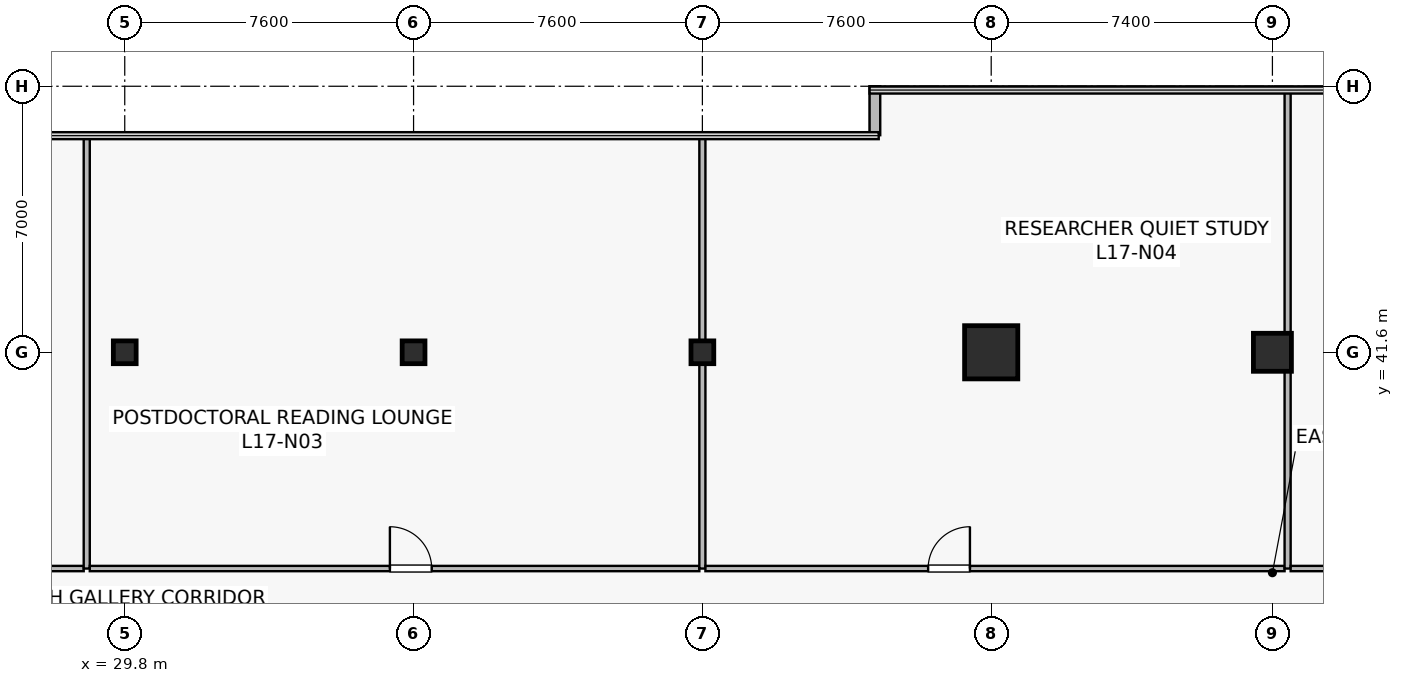
"""IFC4 building model, lengths in metres.
Left out: names, types, materials, properties, quantities, classifications, styles, units other than length and angle.
Written with IfcOpenShell. Run it as: python <this file> out.ifc"""

import sys

from ifc_helpers import new_model, si_unit, direction, frame, frame_2d, origin, origin_2d, place, context, subcontext, project, spatial, rectangle, hollow_rectangle, extrude, source, transform, mapped, element, fill, save


model = new_model("IFC4")
c1 = context("Model", 3, precision=1e-05, world=origin(), true_north=direction((0.0, 1.0)))
c2 = subcontext(c1, "Body", "Model", "MODEL_VIEW")
j1 = project(units=[si_unit("LENGTHUNIT", "METRE"), si_unit("PLANEANGLEUNIT", "RADIAN")], contexts=[c1])
p1 = place(None, origin())
s1 = spatial("IfcSite", under=j1, at=p1, CompositionType="ELEMENT")
p2 = place(p1, origin())
s2 = spatial("IfcBuilding", under=s1, at=p2, CompositionType="ELEMENT")
p3 = place(p2, frame((0.0, 0.0, 70.3)))
s3 = spatial("IfcBuildingStorey", under=s2, at=p3, CompositionType="ELEMENT", Elevation=70.3)
m1 = source(origin(), c2, "Body", "SweptSolid", [
    extrude(rectangle(XDim=1.4, YDim=1.4, at=origin_2d()), origin(), (0.0, 0.0, 1.0), 4.1),
])
p4 = place(p3, frame((52.6, 41.6, 0.0), z_axis=(0.0, 0.0, 1.0), x_axis=(1.0, 0.0, 0.0)))
e1 = element("IfcColumn", 1, at=p4, inside=s3, PredefinedType="COLUMN", context=c2, shape_type="MappedRepresentation", body=[
    mapped(m1, transform((0.0, 0.0, 0.0), scale=1.0)),
])
m2 = source(origin(), c2, "Body", "SweptSolid", [
    extrude(rectangle(XDim=1.0, YDim=1.0, at=origin_2d()), origin(), (0.0, 0.0, 1.0), 4.1),
])
p5 = place(p3, frame((60.0, 41.6, 0.0), z_axis=(0.0, 0.0, 1.0), x_axis=(1.0, 0.0, 0.0)))
e2 = element("IfcColumn", 2, at=p5, inside=s3, PredefinedType="COLUMN", context=c2, shape_type="MappedRepresentation", body=[
    mapped(m2, transform((0.0, 0.0, 0.0), scale=1.0)),
])
m3 = source(origin(), c2, "Body", "SweptSolid", [
    extrude(hollow_rectangle(XDim=0.6, YDim=0.6, WallThickness=0.028, at=origin_2d()), origin(), (0.0, 0.0, 1.0), 4.1),
])
for number, where, z_axis, x_axis in (
    (3, (29.8, 41.6, 0.0), (0.0, 0.0, 1.0), (1.0, 0.0, 0.0)),
    (4, (37.4, 41.6, 0.0), (0.0, 0.0, 1.0), (1.0, 0.0, 0.0)),
    (5, (45.0, 41.6, 0.0), (0.0, 0.0, 1.0), (1.0, 0.0, 0.0)),
):
    element("IfcColumn", number, at=place(p3, frame(where, z_axis=z_axis, x_axis=x_axis)), inside=s3, PredefinedType="COLUMN", context=c2, shape_type="MappedRepresentation", body=[
        mapped(m3, transform((0.0, 0.0, 0.0), scale=1.0)),
    ])
p6 = place(p3, frame((49.54, 48.6, 0.0), z_axis=(0.0, 0.0, 1.0), x_axis=(0.0, -1.0, 0.0)))
e6 = element("IfcWall", 6, at=p6, inside=s3, PredefinedType="STANDARD", context=c2, shape_type="SweptSolid", body=[
    extrude(rectangle(XDim=1.288, YDim=0.28, at=frame_2d((0.644, 0.0))), origin(), (0.0, 0.0, 1.0), 3.78),
])
p7 = place(p3, frame((15.48, 35.91, 0.0), z_axis=(0.0, 0.0, 1.0), x_axis=(1.0, 0.0, 0.0)))
e7 = element("IfcWall", 7, at=p7, inside=s3, PredefinedType="PARTITIONING", context=c2, shape_type="SweptSolid", body=[
    extrude(rectangle(XDim=13.24, YDim=0.14, at=frame_2d((6.62, 0.0))), origin(), (0.0, 0.0, 1.0), 3.115),
])
p8 = place(p7, frame((5.04, 0.0, 0.0)))
e8 = element("IfcOpeningElement", 8, at=p8, cuts=e7, PredefinedType="OPENING", context=c2, shape_type="SweptSolid", body=[
    extrude(rectangle(XDim=1.1, YDim=2.18, at=frame_2d((0.55, 1.09))), frame((0.0, 0.08, 0.0), z_axis=(0.0, -1.0, 0.0), x_axis=(1.0, 0.0, 0.0)), (0.0, 0.0, 1.0), 0.16),
])
p9 = place(p3, frame((28.8, 35.91, 0.0), z_axis=(0.0, 0.0, 1.0), x_axis=(0.0, 1.0, 0.0)))
e9 = element("IfcWall", 9, at=p9, inside=s3, PredefinedType="PARTITIONING", context=c2, shape_type="SweptSolid", body=[
    extrude(rectangle(XDim=11.38, YDim=0.16, at=frame_2d((5.69, 0.0))), origin(), (0.0, 0.0, 1.0), 3.015),
])
p10 = place(p3, frame((28.88, 35.91, 0.0), z_axis=(0.0, 0.0, 1.0), x_axis=(1.0, 0.0, 0.0)))
e10 = element("IfcWall", 10, at=p10, inside=s3, PredefinedType="PARTITIONING", context=c2, shape_type="SweptSolid", body=[
    extrude(rectangle(XDim=16.04, YDim=0.14, at=frame_2d((8.02, 0.0))), origin(), (0.0, 0.0, 1.0), 3.115),
])
p11 = place(p10, frame((7.897, 0.0, 0.0)))
e11 = element("IfcOpeningElement", 11, at=p11, cuts=e10, PredefinedType="OPENING", context=c2, shape_type="SweptSolid", body=[
    extrude(rectangle(XDim=1.1, YDim=2.18, at=frame_2d((0.55, 1.09))), frame((0.0, 0.08, 0.0), z_axis=(0.0, -1.0, 0.0), x_axis=(1.0, 0.0, 0.0)), (0.0, 0.0, 1.0), 0.16),
])
p12 = place(p3, frame((45.0, 35.91, 0.0), z_axis=(0.0, 0.0, 1.0), x_axis=(0.0, 1.0, 0.0)))
e12 = element("IfcWall", 12, at=p12, inside=s3, PredefinedType="PARTITIONING", context=c2, shape_type="SweptSolid", body=[
    extrude(rectangle(XDim=11.38, YDim=0.16, at=frame_2d((5.69, 0.0))), origin(), (0.0, 0.0, 1.0), 3.015),
])
p13 = place(p3, frame((45.08, 35.91, 0.0), z_axis=(0.0, 0.0, 1.0), x_axis=(1.0, 0.0, 0.0)))
e13 = element("IfcWall", 13, at=p13, inside=s3, PredefinedType="PARTITIONING", context=c2, shape_type="SweptSolid", body=[
    extrude(rectangle(XDim=15.24, YDim=0.14, at=frame_2d((7.62, 0.0))), origin(), (0.0, 0.0, 1.0), 3.115),
])
p14 = place(p13, frame((5.86, 0.0, 0.0)))
e14 = element("IfcOpeningElement", 14, at=p14, cuts=e13, PredefinedType="OPENING", context=c2, shape_type="SweptSolid", body=[
    extrude(rectangle(XDim=1.1, YDim=2.18, at=frame_2d((0.55, 1.09))), frame((0.0, 0.08, 0.0), z_axis=(0.0, -1.0, 0.0), x_axis=(1.0, 0.0, 0.0)), (0.0, 0.0, 1.0), 0.16),
])
p15 = place(p3, frame((60.4, 35.91, 0.0), z_axis=(0.0, 0.0, 1.0), x_axis=(0.0, 1.0, 0.0)))
e15 = element("IfcWall", 15, at=p15, inside=s3, PredefinedType="PARTITIONING", context=c2, shape_type="SweptSolid", body=[
    extrude(rectangle(XDim=12.58, YDim=0.16, at=frame_2d((6.29, 0.0))), origin(), (0.0, 0.0, 1.0), 3.015),
])
p16 = place(p3, frame((60.48, 35.91, 0.0), z_axis=(0.0, 0.0, 1.0), x_axis=(1.0, 0.0, 0.0)))
e16 = element("IfcWall", 16, at=p16, inside=s3, PredefinedType="PARTITIONING", context=c2, shape_type="SweptSolid", body=[
    extrude(rectangle(XDim=7.34, YDim=0.14, at=frame_2d((3.67, 0.0))), origin(), (0.0, 0.0, 1.0), 3.265),
])
p17 = place(p16, frame((3.339, 0.0, 0.0)))
e17 = element("IfcOpeningElement", 17, at=p17, cuts=e16, PredefinedType="OPENING", context=c2, shape_type="SweptSolid", body=[
    extrude(rectangle(XDim=1.0, YDim=2.15, at=frame_2d((0.5, 1.075))), frame((0.0, 0.08, 0.0), z_axis=(0.0, -1.0, 0.0), x_axis=(1.0, 0.0, 0.0)), (0.0, 0.0, 1.0), 0.16),
])
m4 = source(origin(), c2, "Body", "SweptSolid", [
    extrude(rectangle(XDim=1.1, YDim=2.18, at=frame_2d((0.55, 1.09))), frame((0.0, 0.025, 0.0), z_axis=(0.0, -1.0, 0.0), x_axis=(1.0, 0.0, 0.0)), (0.0, 0.0, 1.0), 0.05),
])
p18 = place(p11, origin())
e18 = element("IfcDoor", 18, at=p18, inside=s3, OperationType="SINGLE_SWING_LEFT", PredefinedType="DOOR", context=c2, shape_type="MappedRepresentation", body=[
    mapped(m4, transform((0.0, 0.0, 0.0), scale=1.0)),
])
fill(e11, e18)
p19 = place(p14, origin())
e19 = element("IfcDoor", 19, at=p19, inside=s3, OperationType="SINGLE_SWING_RIGHT", PredefinedType="DOOR", context=c2, shape_type="MappedRepresentation", body=[
    mapped(m4, transform((0.0, 0.0, 0.0), scale=1.0)),
])
fill(e14, e19)
save(model, sys.argv[1])
